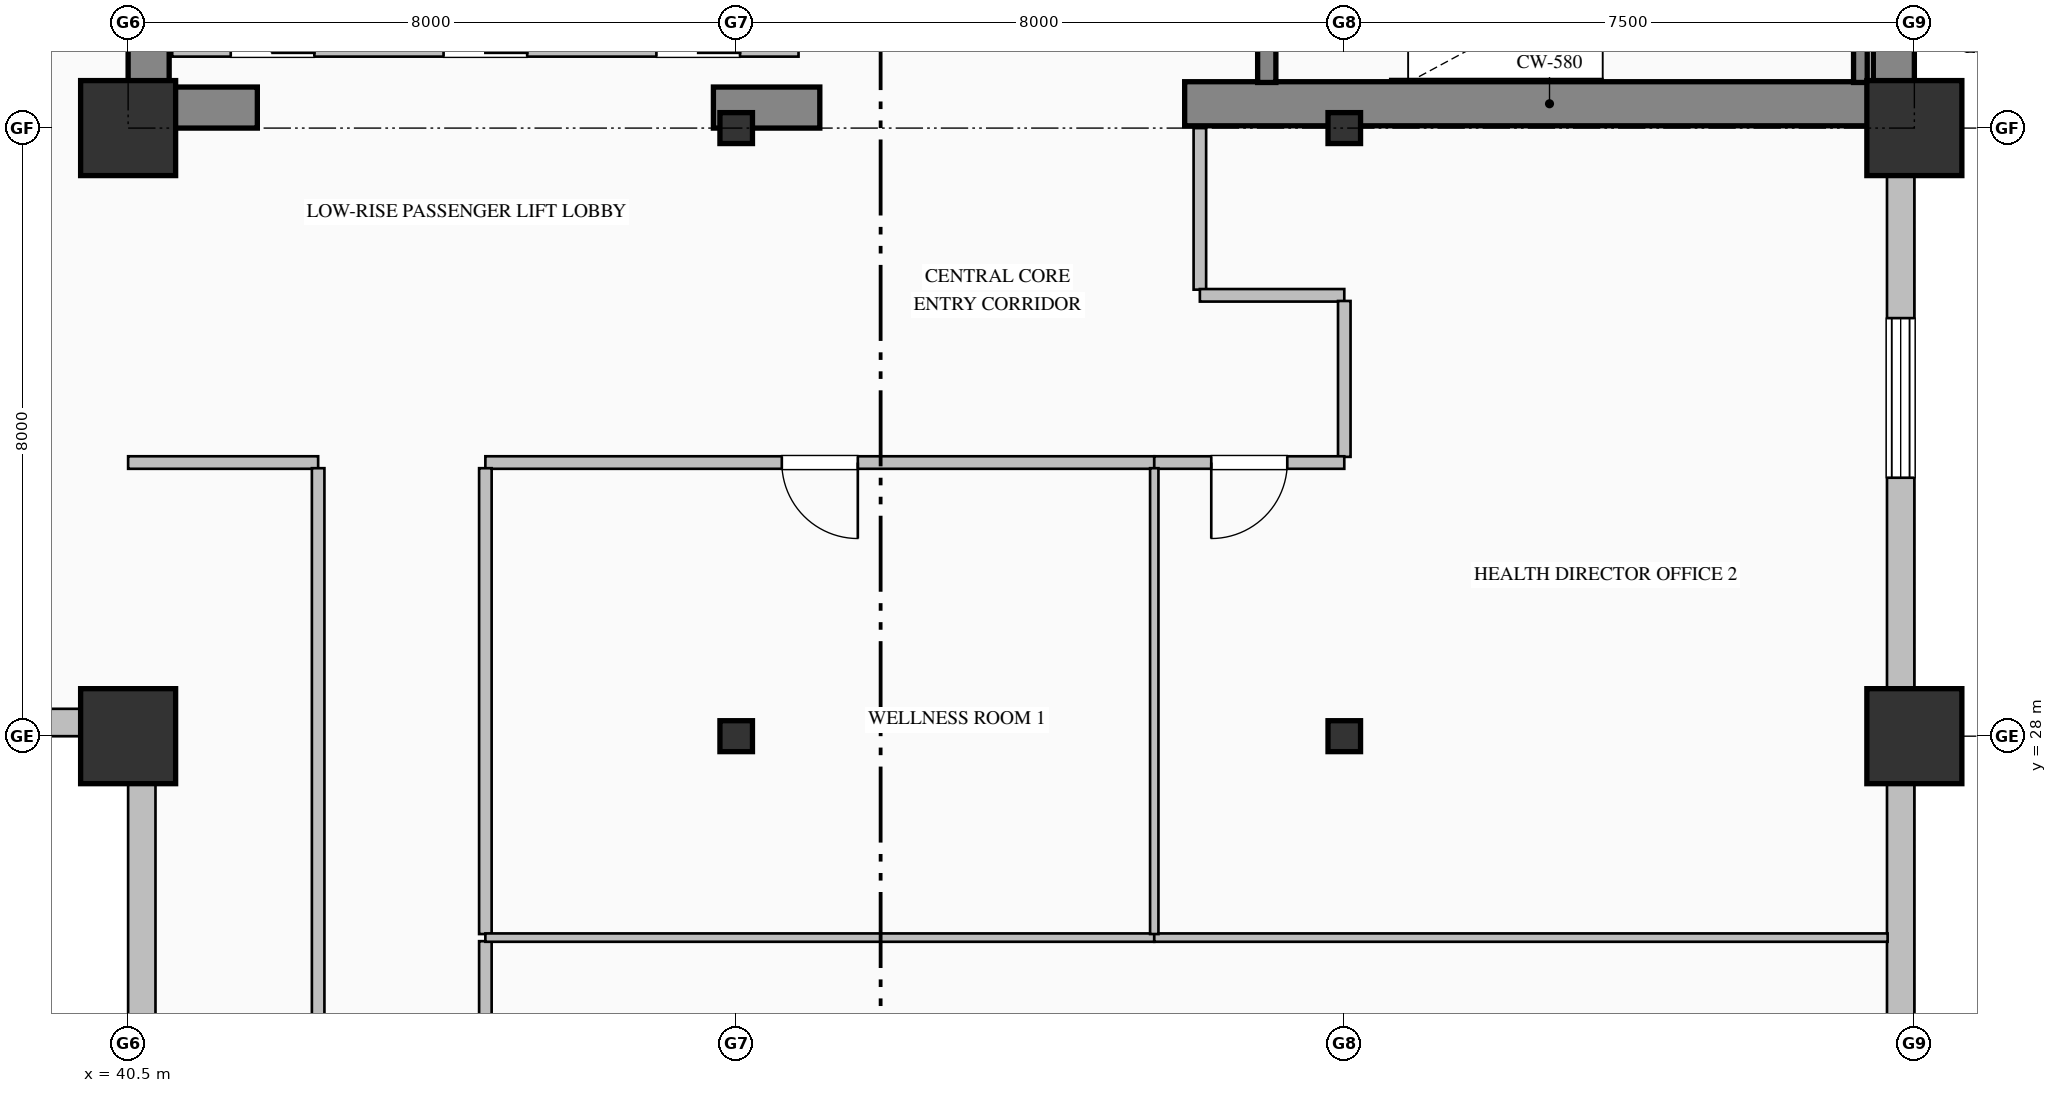
"""IFC4 building model, lengths in metres.
Left out: names, types, materials, properties, quantities, classifications, styles, units other than length and angle.
Written with IfcOpenShell. Run it as: python <this file> out.ifc"""

import sys

from ifc_helpers import new_model, si_unit, direction, frame, frame_2d, origin, origin_2d, place, context, subcontext, project, spatial, rectangle, hollow_rectangle, i_section, extrude, element, fill, save


model = new_model("IFC4")
c1 = context("Model", 3, precision=1e-05, world=origin(), true_north=direction((0.0, 1.0)))
c2 = subcontext(c1, "Body", "Model", "MODEL_VIEW")
j1 = project(units=[si_unit("LENGTHUNIT", "METRE"), si_unit("PLANEANGLEUNIT", "RADIAN")], contexts=[c1])
p1 = place(None, origin())
s1 = spatial("IfcSite", under=j1, at=p1, CompositionType="ELEMENT")
p2 = place(p1, origin())
s2 = spatial("IfcBuilding", under=s1, at=p2, CompositionType="ELEMENT")
p3 = place(p2, frame((0.0, 0.0, 80.2)))
s3 = spatial("IfcBuildingStorey", under=s2, at=p3, CompositionType="ELEMENT", Elevation=80.2)
p4 = place(p3, frame((63.73, 36.32, 0.0), z_axis=(0.0, 0.0, 1.0), x_axis=(0.0, 1.0, 0.0)))
e1 = element("IfcWall", 1, at=p4, inside=s3, PredefinedType="SHEAR", context=c2, shape_type="SweptSolid", body=[
    extrude(rectangle(XDim=15.14, YDim=0.54, at=frame_2d((7.57, 0.0))), origin(), (0.0, 0.0, 1.0), 3.75),
])
p5 = place(p3, frame((40.77, 36.54, 0.0), z_axis=(0.0, 0.0, 1.0), x_axis=(0.0, 1.0, 0.0)))
e2 = element("IfcWall", 2, at=p5, inside=s3, PredefinedType="SHEAR", context=c2, shape_type="SweptSolid", body=[
    extrude(rectangle(XDim=7.86, YDim=0.54, at=frame_2d((3.93, 0.0))), origin(), (0.0, 0.0, 1.0), 3.75),
])
p6 = place(p3, frame((40.5, 36.27, 0.0), z_axis=(0.0, 0.0, 1.0), x_axis=(1.0, 0.0, 0.0)))
e3 = element("IfcWall", 3, at=p6, inside=s3, PredefinedType="SHEAR", context=c2, shape_type="SweptSolid", body=[
    extrude(rectangle(XDim=1.7, YDim=0.54, at=frame_2d((0.85, 0.0))), origin(), (0.0, 0.0, 1.0), 3.75),
])
p7 = place(p3, frame((48.2, 36.27, 0.0), z_axis=(0.0, 0.0, 1.0), x_axis=(1.0, 0.0, 0.0)))
e4 = element("IfcWall", 4, at=p7, inside=s3, PredefinedType="SHEAR", context=c2, shape_type="SweptSolid", body=[
    extrude(rectangle(XDim=1.4, YDim=0.54, at=frame_2d((0.7, 0.0))), origin(), (0.0, 0.0, 1.0), 3.75),
])
p8 = place(p3, frame((54.4, 36.32, 0.0), z_axis=(0.0, 0.0, 1.0), x_axis=(1.0, 0.0, 0.0)))
e5 = element("IfcWall", 5, at=p8, inside=s3, PredefinedType="SHEAR", context=c2, shape_type="SweptSolid", body=[
    extrude(rectangle(XDim=9.6, YDim=0.58, at=frame_2d((4.8, 0.0))), origin(), (0.0, 0.0, 1.0), 4.0),
])
for number, where, z_axis, x_axis in (
    (6, (40.5, 28.0, 0.0), (0.0, 0.0, 1.0), (1.0, 0.0, 0.0)),
    (7, (40.5, 36.0, 0.0), (0.0, 0.0, 1.0), (1.0, 0.0, 0.0)),
):
    element("IfcColumn", number, at=place(p3, frame(where, z_axis=z_axis, x_axis=x_axis)), inside=s3, PredefinedType="COLUMN", context=c2, shape_type="SweptSolid", body=[
        extrude(hollow_rectangle(XDim=1.25, YDim=1.25, WallThickness=0.045, at=origin_2d()), origin(), (0.0, 0.0, 1.0), 4.0),
    ])
for number, where, z_axis, x_axis in (
    (8, (48.5, 28.0, 0.0), (0.0, 0.0, 1.0), (1.0, 0.0, 0.0)),
    (9, (48.5, 36.0, 0.0), (0.0, 0.0, 1.0), (1.0, 0.0, 0.0)),
    (10, (56.5, 28.0, 0.0), (0.0, 0.0, 1.0), (1.0, 0.0, 0.0)),
    (11, (56.5, 36.0, 0.0), (0.0, 0.0, 1.0), (1.0, 0.0, 0.0)),
):
    element("IfcColumn", number, at=place(p3, frame(where, z_axis=z_axis, x_axis=x_axis)), inside=s3, PredefinedType="COLUMN", context=c2, shape_type="SweptSolid", body=[
        extrude(i_section(OverallWidth=0.407, OverallDepth=0.428, WebThickness=0.02, FlangeThickness=0.035, FilletRadius=0.022, at=origin_2d()), origin(), (0.0, 0.0, 1.0), 4.0),
    ])
for number, where, z_axis, x_axis in (
    (12, (64.0, 28.0, 0.0), (0.0, 0.0, 1.0), (1.0, 0.0, 0.0)),
    (13, (64.0, 36.0, 0.0), (0.0, 0.0, 1.0), (1.0, 0.0, 0.0)),
):
    element("IfcColumn", number, at=place(p3, frame(where, z_axis=z_axis, x_axis=x_axis)), inside=s3, PredefinedType="COLUMN", context=c2, shape_type="SweptSolid", body=[
        extrude(hollow_rectangle(XDim=1.25, YDim=1.25, WallThickness=0.045, at=origin_2d()), origin(), (0.0, 0.0, 1.0), 4.0),
    ])
p9 = place(p3, frame((40.68, 8.0, 0.0), z_axis=(0.0, 0.0, 1.0), x_axis=(0.0, 1.0, 0.0)))
e14 = element("IfcWall", 14, at=p9, inside=s3, PredefinedType="SOLIDWALL", context=c2, shape_type="SweptSolid", body=[
    extrude(rectangle(XDim=20.36, YDim=0.36, at=frame_2d((10.18, 0.0))), origin(), (0.0, 0.0, 1.0), 3.05),
])
p10 = place(p9, frame((6.6, 0.0, 0.7)))
e15 = element("IfcOpeningElement", 15, at=p10, cuts=e14, PredefinedType="OPENING", context=c2, shape_type="SweptSolid", body=[
    extrude(rectangle(XDim=1.2, YDim=1.85, at=frame_2d((0.6, 0.925))), frame((0.0, 0.19, 0.0), z_axis=(0.0, -1.0, 0.0), x_axis=(1.0, 0.0, 0.0)), (0.0, 0.0, 1.0), 0.38),
])
p11 = place(p9, frame((13.8, 0.0, 0.7)))
e16 = element("IfcOpeningElement", 16, at=p11, cuts=e14, PredefinedType="OPENING", context=c2, shape_type="SweptSolid", body=[
    extrude(rectangle(XDim=1.2, YDim=1.85, at=frame_2d((0.6, 0.925))), frame((0.0, 0.19, 0.0), z_axis=(0.0, -1.0, 0.0), x_axis=(1.0, 0.0, 0.0)), (0.0, 0.0, 1.0), 0.38),
])
p12 = place(p3, frame((40.52, 28.18, 0.0), z_axis=(0.0, 0.0, 1.0), x_axis=(-1.0, 0.0, 0.0)))
e17 = element("IfcWall", 17, at=p12, inside=s3, PredefinedType="SOLIDWALL", context=c2, shape_type="SweptSolid", body=[
    extrude(rectangle(XDim=36.52, YDim=0.36, at=frame_2d((18.26, 0.0))), origin(), (0.0, 0.0, 1.0), 3.05),
])
p13 = place(p12, frame((10.2, 0.0, 0.7)))
e18 = element("IfcOpeningElement", 18, at=p13, cuts=e17, PredefinedType="OPENING", context=c2, shape_type="SweptSolid", body=[
    extrude(rectangle(XDim=1.2, YDim=1.85, at=frame_2d((0.6, 0.925))), frame((0.0, 0.19, 0.0), z_axis=(0.0, -1.0, 0.0), x_axis=(1.0, 0.0, 0.0)), (0.0, 0.0, 1.0), 0.38),
])
p14 = place(p12, frame((17.4, 0.0, 0.7)))
e19 = element("IfcOpeningElement", 19, at=p14, cuts=e17, PredefinedType="OPENING", context=c2, shape_type="SweptSolid", body=[
    extrude(rectangle(XDim=1.2, YDim=1.85, at=frame_2d((0.6, 0.925))), frame((0.0, 0.19, 0.0), z_axis=(0.0, -1.0, 0.0), x_axis=(1.0, 0.0, 0.0)), (0.0, 0.0, 1.0), 0.38),
])
p15 = place(p12, frame((21.0, 0.0, 0.7)))
e20 = element("IfcOpeningElement", 20, at=p15, cuts=e17, PredefinedType="OPENING", context=c2, shape_type="SweptSolid", body=[
    extrude(rectangle(XDim=1.2, YDim=1.85, at=frame_2d((0.6, 0.925))), frame((0.0, 0.19, 0.0), z_axis=(0.0, -1.0, 0.0), x_axis=(1.0, 0.0, 0.0)), (0.0, 0.0, 1.0), 0.38),
])
p16 = place(p12, frame((28.2, 0.0, 0.7)))
e21 = element("IfcOpeningElement", 21, at=p16, cuts=e17, PredefinedType="OPENING", context=c2, shape_type="SweptSolid", body=[
    extrude(rectangle(XDim=1.2, YDim=1.85, at=frame_2d((0.6, 0.925))), frame((0.0, 0.19, 0.0), z_axis=(0.0, -1.0, 0.0), x_axis=(1.0, 0.0, 0.0)), (0.0, 0.0, 1.0), 0.38),
])
p17 = place(p3, frame((63.82, 36.05, 0.0), z_axis=(0.0, 0.0, 1.0), x_axis=(0.0, -1.0, 0.0)))
e22 = element("IfcWall", 22, at=p17, inside=s3, PredefinedType="SOLIDWALL", context=c2, shape_type="SweptSolid", body=[
    extrude(rectangle(XDim=28.05, YDim=0.36, at=frame_2d((14.025, 0.0))), origin(), (0.0, 0.0, 1.0), 3.25),
])
p18 = place(p17, frame((2.55, 0.0, 0.85)))
e23 = element("IfcOpeningElement", 23, at=p18, cuts=e22, PredefinedType="OPENING", context=c2, shape_type="SweptSolid", body=[
    extrude(rectangle(XDim=2.1, YDim=2.05, at=frame_2d((1.05, 1.025))), frame((0.0, 0.19, 0.0), z_axis=(0.0, -1.0, 0.0), x_axis=(1.0, 0.0, 0.0)), (0.0, 0.0, 1.0), 0.38),
])
p19 = place(p17, frame((13.35, 0.0, 0.85)))
e24 = element("IfcOpeningElement", 24, at=p19, cuts=e22, PredefinedType="OPENING", context=c2, shape_type="SweptSolid", body=[
    extrude(rectangle(XDim=2.1, YDim=2.05, at=frame_2d((1.05, 1.025))), frame((0.0, 0.19, 0.0), z_axis=(0.0, -1.0, 0.0), x_axis=(1.0, 0.0, 0.0)), (0.0, 0.0, 1.0), 0.38),
])
p20 = place(p3, frame((55.48, 39.75, 0.0), z_axis=(0.0, 0.0, 1.0), x_axis=(0.0, -1.0, 0.0)))
e25 = element("IfcWall", 25, at=p20, inside=s3, PredefinedType="SOLIDWALL", context=c2, shape_type="SweptSolid", body=[
    extrude(rectangle(XDim=3.15, YDim=0.24, at=frame_2d((1.575, 0.0))), origin(), (0.0, 0.0, 1.0), 4.0),
])
p21 = place(p20, frame((1.0, 0.0, 0.0)))
e26 = element("IfcOpeningElement", 26, at=p21, cuts=e25, PredefinedType="OPENING", context=c2, shape_type="SweptSolid", body=[
    extrude(rectangle(XDim=1.15, YDim=2.2, at=frame_2d((0.575, 1.1))), frame((0.0, 0.13, 0.0), z_axis=(0.0, -1.0, 0.0), x_axis=(1.0, 0.0, 0.0)), (0.0, 0.0, 1.0), 0.26),
])
p22 = place(p3, frame((63.29, 36.6, 0.0), z_axis=(0.0, 0.0, 1.0), x_axis=(0.0, 1.0, 0.0)))
e27 = element("IfcWall", 27, at=p22, inside=s3, PredefinedType="SOLIDWALL", context=c2, shape_type="SweptSolid", body=[
    extrude(rectangle(XDim=3.15, YDim=0.18, at=frame_2d((1.575, 0.0))), origin(), (0.0, 0.0, 1.0), 4.0),
])
p23 = place(p3, frame((49.32, 37.05, 0.0), z_axis=(0.0, 0.0, 1.0), x_axis=(-1.0, 0.0, 0.0)))
e28 = element("IfcWall", 28, at=p23, inside=s3, PredefinedType="PARTITIONING", context=c2, shape_type="SweptSolid", body=[
    extrude(rectangle(XDim=8.24, YDim=0.22, at=frame_2d((4.12, 0.0))), origin(), (0.0, 0.0, 1.0), 3.75),
])
p24 = place(p23, frame((6.37, 0.0, 0.0)))
e29 = element("IfcOpeningElement", 29, at=p24, cuts=e28, PredefinedType="OPENING", context=c2, shape_type="SweptSolid", body=[
    extrude(rectangle(XDim=1.1, YDim=2.2, at=frame_2d((0.55, 1.1))), frame((0.0, 0.12, 0.0), z_axis=(0.0, -1.0, 0.0), x_axis=(1.0, 0.0, 0.0)), (0.0, 0.0, 1.0), 0.24),
])
p25 = place(p23, frame((3.57, 0.0, 0.0)))
e30 = element("IfcOpeningElement", 30, at=p25, cuts=e28, PredefinedType="OPENING", context=c2, shape_type="SweptSolid", body=[
    extrude(rectangle(XDim=1.1, YDim=2.2, at=frame_2d((0.55, 1.1))), frame((0.0, 0.12, 0.0), z_axis=(0.0, -1.0, 0.0), x_axis=(1.0, 0.0, 0.0)), (0.0, 0.0, 1.0), 0.24),
])
p26 = place(p23, frame((0.77, 0.0, 0.0)))
e31 = element("IfcOpeningElement", 31, at=p26, cuts=e28, PredefinedType="OPENING", context=c2, shape_type="SweptSolid", body=[
    extrude(rectangle(XDim=1.1, YDim=2.2, at=frame_2d((0.55, 1.1))), frame((0.0, 0.12, 0.0), z_axis=(0.0, -1.0, 0.0), x_axis=(1.0, 0.0, 0.0)), (0.0, 0.0, 1.0), 0.24),
])
p27 = place(p3, frame((54.0, 31.6, 0.0), z_axis=(0.0, 0.0, 1.0), x_axis=(-1.0, 0.0, 0.0)))
e32 = element("IfcWall", 32, at=p27, inside=s3, PredefinedType="PARTITIONING", context=c2, shape_type="SweptSolid", body=[
    extrude(rectangle(XDim=8.8, YDim=0.165, at=frame_2d((4.4, 0.0))), origin(), (0.0, 0.0, 1.0), 3.75),
])
p28 = place(p27, frame((3.9, 0.0, 0.0)))
e33 = element("IfcOpeningElement", 33, at=p28, cuts=e32, PredefinedType="OPENING", context=c2, shape_type="SweptSolid", body=[
    extrude(rectangle(XDim=1.0, YDim=2.15, at=frame_2d((0.5, 1.075))), frame((0.0, 0.093, 0.0), z_axis=(0.0, -1.0, 0.0), x_axis=(1.0, 0.0, 0.0)), (0.0, 0.0, 1.0), 0.185),
])
p29 = place(p3, frame((54.6, 36.0, 0.0), z_axis=(0.0, 0.0, 1.0), x_axis=(0.0, -1.0, 0.0)))
e34 = element("IfcWall", 34, at=p29, inside=s3, PredefinedType="PARTITIONING", context=c2, shape_type="SweptSolid", body=[
    extrude(rectangle(XDim=2.125, YDim=0.165, at=frame_2d((1.063, 0.0))), origin(), (0.0, 0.0, 1.0), 3.75),
])
p30 = place(p3, frame((54.6, 33.8, 0.0), z_axis=(0.0, 0.0, 1.0), x_axis=(1.0, 0.0, 0.0)))
e35 = element("IfcWall", 35, at=p30, inside=s3, PredefinedType="PARTITIONING", context=c2, shape_type="SweptSolid", body=[
    extrude(rectangle(XDim=1.9, YDim=0.165, at=frame_2d((0.95, 0.0))), origin(), (0.0, 0.0, 1.0), 3.75),
])
p31 = place(p3, frame((56.5, 33.726, 0.0), z_axis=(0.0, 0.0, 1.0), x_axis=(0.0, -1.0, 0.0)))
e36 = element("IfcWall", 36, at=p31, inside=s3, PredefinedType="PARTITIONING", context=c2, shape_type="SweptSolid", body=[
    extrude(rectangle(XDim=2.051, YDim=0.165, at=frame_2d((1.025, 0.0))), origin(), (0.0, 0.0, 1.0), 3.042),
])
p32 = place(p3, frame((56.5, 31.6, 0.0), z_axis=(0.0, 0.0, 1.0), x_axis=(-1.0, 0.0, 0.0)))
e37 = element("IfcWall", 37, at=p32, inside=s3, PredefinedType="PARTITIONING", context=c2, shape_type="SweptSolid", body=[
    extrude(rectangle(XDim=2.5, YDim=0.165, at=frame_2d((1.25, 0.0))), origin(), (0.0, 0.0, 1.0), 3.75),
])
p33 = place(p32, frame((0.75, 0.0, 0.0)))
e38 = element("IfcOpeningElement", 38, at=p33, cuts=e37, PredefinedType="OPENING", context=c2, shape_type="SweptSolid", body=[
    extrude(rectangle(XDim=1.0, YDim=2.15, at=frame_2d((0.5, 1.075))), frame((0.0, 0.093, 0.0), z_axis=(0.0, -1.0, 0.0), x_axis=(1.0, 0.0, 0.0)), (0.0, 0.0, 1.0), 0.185),
])
p34 = place(p3, frame((43.0, 31.6, 0.0), z_axis=(0.0, 0.0, 1.0), x_axis=(-1.0, 0.0, 0.0)))
e39 = element("IfcWall", 39, at=p34, inside=s3, PredefinedType="PARTITIONING", context=c2, shape_type="SweptSolid", body=[
    extrude(rectangle(XDim=2.5, YDim=0.165, at=frame_2d((1.25, 0.0))), origin(), (0.0, 0.0, 1.0), 3.75),
])
p35 = place(p3, frame((45.2, 25.303, 0.0), z_axis=(0.0, 0.0, 1.0), x_axis=(0.0, -1.0, 0.0)))
e40 = element("IfcWall", 40, at=p35, inside=s3, PredefinedType="PARTITIONING", context=c2, shape_type="SweptSolid", body=[
    extrude(rectangle(XDim=10.529, YDim=0.165, at=frame_2d((5.264, 0.0))), origin(), (0.0, 0.0, 1.0), 3.75),
])
p36 = place(p3, frame((45.2, 31.525, 0.0), z_axis=(0.0, 0.0, 1.0), x_axis=(0.0, -1.0, 0.0)))
e41 = element("IfcWall", 41, at=p36, inside=s3, PredefinedType="PARTITIONING", context=c2, shape_type="SweptSolid", body=[
    extrude(rectangle(XDim=6.128, YDim=0.165, at=frame_2d((3.064, 0.0))), origin(), (0.0, 0.0, 1.0), 3.75),
])
p37 = place(p3, frame((43.0, 12.574, 0.0), z_axis=(0.0, 0.0, 1.0), x_axis=(0.0, 1.0, 0.0)))
e42 = element("IfcWall", 42, at=p37, inside=s3, PredefinedType="PARTITIONING", context=c2, shape_type="SweptSolid", body=[
    extrude(rectangle(XDim=18.951, YDim=0.165, at=frame_2d((9.476, 0.0))), origin(), (0.0, 0.0, 1.0), 3.75),
])
p38 = place(p37, frame((9.025, 0.0, 0.0)))
e43 = element("IfcOpeningElement", 43, at=p38, cuts=e42, PredefinedType="OPENING", context=c2, shape_type="SweptSolid", body=[
    extrude(rectangle(XDim=0.9, YDim=2.15, at=frame_2d((0.45, 1.075))), frame((0.0, 0.093, 0.0), z_axis=(0.0, -1.0, 0.0), x_axis=(1.0, 0.0, 0.0)), (0.0, 0.0, 1.0), 0.185),
])
p39 = place(p3, frame((45.2, 25.35, 0.0), z_axis=(0.0, 0.0, 1.0), x_axis=(1.0, 0.0, 0.0)))
e44 = element("IfcWall", 44, at=p39, inside=s3, PredefinedType="MOVABLE", context=c2, shape_type="SweptSolid", body=[
    extrude(rectangle(XDim=8.8, YDim=0.11, at=frame_2d((4.4, 0.0))), origin(), (0.0, 0.0, 1.0), 3.75),
])
p40 = place(p3, frame((54.0, 25.35, 0.0), z_axis=(0.0, 0.0, 1.0), x_axis=(1.0, 0.0, 0.0)))
e45 = element("IfcWall", 45, at=p40, inside=s3, PredefinedType="MOVABLE", context=c2, shape_type="SweptSolid", body=[
    extrude(rectangle(XDim=9.648, YDim=0.11, at=frame_2d((4.824, 0.0))), origin(), (0.0, 0.0, 1.0), 3.75),
])
p41 = place(p3, frame((54.0, 31.525, 0.0), z_axis=(0.0, 0.0, 1.0), x_axis=(0.0, -1.0, 0.0)))
e46 = element("IfcWall", 46, at=p41, inside=s3, PredefinedType="MOVABLE", context=c2, shape_type="SweptSolid", body=[
    extrude(rectangle(XDim=6.128, YDim=0.11, at=frame_2d((3.064, 0.0))), origin(), (0.0, 0.0, 1.0), 3.75),
])
p42 = place(p18, origin())
e47 = element("IfcWindow", 47, at=p42, inside=s3, PartitioningType="TRIPLE_PANEL_VERTICAL", PredefinedType="WINDOW", context=c2, shape_type="SweptSolid", body=[
    extrude(rectangle(XDim=2.1, YDim=2.05, at=frame_2d((1.05, 1.025))), frame((0.0, 0.15, 0.0), z_axis=(0.0, -1.0, 0.0), x_axis=(1.0, 0.0, 0.0)), (0.0, 0.0, 1.0), 0.06),
])
fill(e23, e47)
p43 = place(p28, origin())
e48 = element("IfcDoor", 48, at=p43, inside=s3, OperationType="SINGLE_SWING_LEFT", PredefinedType="DOOR", context=c2, shape_type="SweptSolid", body=[
    extrude(rectangle(XDim=1.0, YDim=2.15, at=frame_2d((0.5, 1.075))), frame((0.0, 0.025, 0.0), z_axis=(0.0, -1.0, 0.0), x_axis=(1.0, 0.0, 0.0)), (0.0, 0.0, 1.0), 0.05),
])
fill(e33, e48)
p44 = place(p33, origin())
e49 = element("IfcDoor", 49, at=p44, inside=s3, OperationType="SINGLE_SWING_RIGHT", PredefinedType="DOOR", context=c2, shape_type="SweptSolid", body=[
    extrude(rectangle(XDim=1.0, YDim=2.15, at=frame_2d((0.5, 1.075))), frame((0.0, 0.025, 0.0), z_axis=(0.0, -1.0, 0.0), x_axis=(1.0, 0.0, 0.0)), (0.0, 0.0, 1.0), 0.05),
])
fill(e38, e49)
save(model, sys.argv[1])
